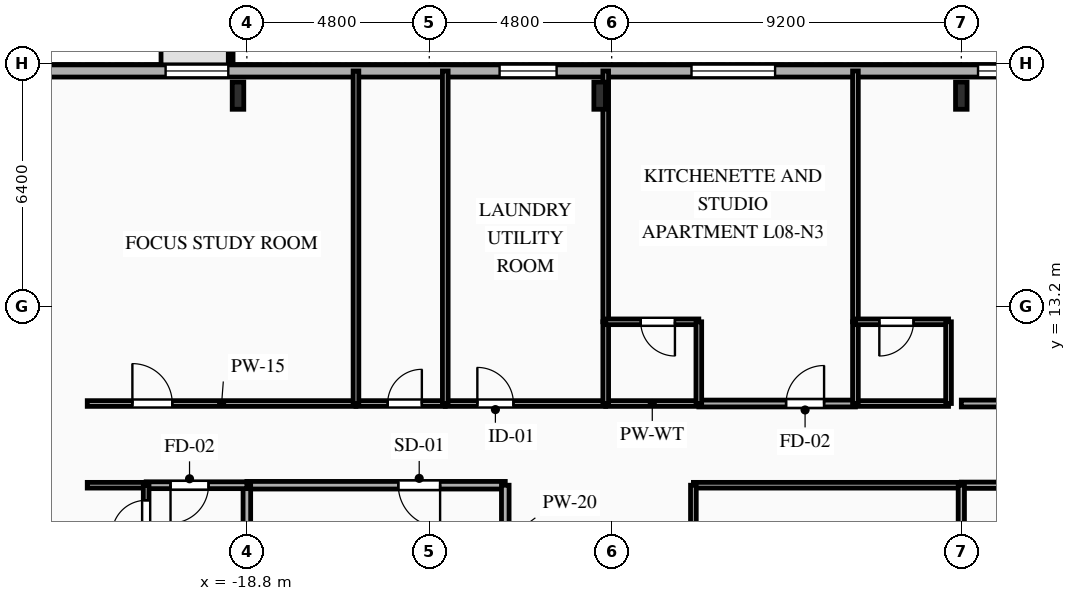
"""IFC4 building model, lengths in metres.
Left out: names, types, materials, properties, quantities, classifications, styles, units other than length and angle.
Written with IfcOpenShell. Run it as: python <this file> out.ifc"""

import sys

from ifc_helpers import new_model, si_unit, direction, frame, frame_2d, origin, origin_2d, place, context, subcontext, project, spatial, rectangle, i_section, extrude, element, fill, save


model = new_model("IFC4")
c1 = context("Model", 3, precision=1e-05, world=origin(), true_north=direction((0.0, 1.0)))
c2 = subcontext(c1, "Body", "Model", "MODEL_VIEW")
j1 = project(units=[si_unit("LENGTHUNIT", "METRE"), si_unit("PLANEANGLEUNIT", "RADIAN")], contexts=[c1])
p1 = place(None, origin())
s1 = spatial("IfcSite", under=j1, at=p1, CompositionType="ELEMENT")
p2 = place(p1, origin())
s2 = spatial("IfcBuilding", under=s1, at=p2, CompositionType="ELEMENT")
p3 = place(p2, frame((0.0, 0.0, 33.7)))
s3 = spatial("IfcBuildingStorey", under=s2, at=p3, CompositionType="ELEMENT", Elevation=33.7)
for number, where, z_axis, x_axis in (
    (1, (0.0, 18.75, 0.0), (0.0, 0.0, 1.0), (1.0, 0.0, 0.0)),
    (2, (-9.517, 18.75, 0.0), (0.0, 0.0, 1.0), (1.0, 0.0, 0.0)),
    (3, (-19.033, 18.75, 0.0), (0.0, 0.0, 1.0), (1.0, 0.0, 0.0)),
):
    element("IfcColumn", number, at=place(p3, frame(where, z_axis=z_axis, x_axis=x_axis)), inside=s3, PredefinedType="COLUMN", context=c2, shape_type="SweptSolid", body=[
        extrude(i_section(OverallWidth=0.304, OverallDepth=0.716, WebThickness=0.021, FlangeThickness=0.04, FilletRadius=0.027, at=origin_2d()), origin(), (0.0, 0.0, 1.0), 3.35),
    ])
p4 = place(p3, frame((-29.2, 19.4, 0.0), z_axis=(0.0, 0.0, 1.0), x_axis=(1.0, 0.0, 0.0)))
e4 = element("IfcWall", 4, at=p4, inside=s3, PredefinedType="SOLIDWALL", context=c2, shape_type="SweptSolid", body=[
    extrude(rectangle(XDim=58.4, YDim=0.32, at=frame_2d((29.2, 0.0))), origin(), (0.0, 0.0, 1.0), 3.035),
])
p5 = place(p4, frame((8.261, 0.0, 0.85)))
e5 = element("IfcOpeningElement", 5, at=p5, cuts=e4, PredefinedType="OPENING", context=c2, shape_type="SweptSolid", body=[
    extrude(rectangle(XDim=1.65, YDim=1.85, at=frame_2d((0.825, 0.925))), frame((0.0, 0.17, 0.0), z_axis=(0.0, -1.0, 0.0), x_axis=(1.0, 0.0, 0.0)), (0.0, 0.0, 1.0), 0.34),
])
p6 = place(p4, frame((17.05, 0.0, 0.85)))
e6 = element("IfcOpeningElement", 6, at=p6, cuts=e4, PredefinedType="OPENING", context=c2, shape_type="SweptSolid", body=[
    extrude(rectangle(XDim=1.5, YDim=1.85, at=frame_2d((0.75, 0.925))), frame((0.0, 0.17, 0.0), z_axis=(0.0, -1.0, 0.0), x_axis=(1.0, 0.0, 0.0)), (0.0, 0.0, 1.0), 0.34),
])
p7 = place(p4, frame((22.1, 0.0, 0.85)))
e7 = element("IfcOpeningElement", 7, at=p7, cuts=e4, PredefinedType="OPENING", context=c2, shape_type="SweptSolid", body=[
    extrude(rectangle(XDim=2.2, YDim=1.85, at=frame_2d((1.1, 0.925))), frame((0.0, 0.17, 0.0), z_axis=(0.0, -1.0, 0.0), x_axis=(1.0, 0.0, 0.0)), (0.0, 0.0, 1.0), 0.34),
])
p8 = place(p4, frame((29.64, 0.0, 0.85)))
e8 = element("IfcOpeningElement", 8, at=p8, cuts=e4, PredefinedType="OPENING", context=c2, shape_type="SweptSolid", body=[
    extrude(rectangle(XDim=2.2, YDim=1.85, at=frame_2d((1.1, 0.925))), frame((0.0, 0.17, 0.0), z_axis=(0.0, -1.0, 0.0), x_axis=(1.0, 0.0, 0.0)), (0.0, 0.0, 1.0), 0.34),
])
p9 = place(p4, frame((35.22, 0.0, 0.85)))
e9 = element("IfcOpeningElement", 9, at=p9, cuts=e4, PredefinedType="OPENING", context=c2, shape_type="SweptSolid", body=[
    extrude(rectangle(XDim=2.2, YDim=1.85, at=frame_2d((1.1, 0.925))), frame((0.0, 0.17, 0.0), z_axis=(0.0, -1.0, 0.0), x_axis=(1.0, 0.0, 0.0)), (0.0, 0.0, 1.0), 0.34),
])
p10 = place(p4, frame((41.78, 0.0, 0.85)))
e10 = element("IfcOpeningElement", 10, at=p10, cuts=e4, PredefinedType="OPENING", context=c2, shape_type="SweptSolid", body=[
    extrude(rectangle(XDim=2.2, YDim=1.85, at=frame_2d((1.1, 0.925))), frame((0.0, 0.17, 0.0), z_axis=(0.0, -1.0, 0.0), x_axis=(1.0, 0.0, 0.0)), (0.0, 0.0, 1.0), 0.34),
])
p11 = place(p4, frame((48.905, 0.0, 0.85)))
e11 = element("IfcOpeningElement", 11, at=p11, cuts=e4, PredefinedType="OPENING", context=c2, shape_type="SweptSolid", body=[
    extrude(rectangle(XDim=1.65, YDim=1.85, at=frame_2d((0.825, 0.925))), frame((0.0, 0.17, 0.0), z_axis=(0.0, -1.0, 0.0), x_axis=(1.0, 0.0, 0.0)), (0.0, 0.0, 1.0), 0.34),
])
p12 = place(p3, frame((-12.0, 8.5, 0.0), z_axis=(0.0, 0.0, 1.0), x_axis=(-1.0, 0.0, 0.0)))
e12 = element("IfcWall", 12, at=p12, inside=s3, PredefinedType="PARTITIONING", context=c2, shape_type="SweptSolid", body=[
    extrude(rectangle(XDim=6.8, YDim=0.2, at=frame_2d((3.4, 0.0))), origin(), (0.0, 0.0, 1.0), 3.035),
])
p13 = place(p12, frame((1.715, 0.0, 0.0)))
e13 = element("IfcOpeningElement", 13, at=p13, cuts=e12, PredefinedType="OPENING", context=c2, shape_type="SweptSolid", body=[
    extrude(rectangle(XDim=1.1, YDim=2.15, at=frame_2d((0.55, 1.075))), frame((0.0, 0.11, 0.0), z_axis=(0.0, -1.0, 0.0), x_axis=(1.0, 0.0, 0.0)), (0.0, 0.0, 1.0), 0.22),
])
p14 = place(p3, frame((-12.0, 5.6, 0.0), z_axis=(0.0, 0.0, 1.0), x_axis=(0.0, 1.0, 0.0)))
e14 = element("IfcWall", 14, at=p14, inside=s3, PredefinedType="PARTITIONING", context=c2, shape_type="SweptSolid", body=[
    extrude(rectangle(XDim=2.9, YDim=0.2, at=frame_2d((1.45, 0.0))), origin(), (0.0, 0.0, 1.0), 3.035),
])
p15 = place(p3, frame((-18.8, 8.5, 0.0), z_axis=(0.0, 0.0, 1.0), x_axis=(0.0, -1.0, 0.0)))
e15 = element("IfcWall", 15, at=p15, inside=s3, PredefinedType="PARTITIONING", context=c2, shape_type="SweptSolid", body=[
    extrude(rectangle(XDim=2.9, YDim=0.2, at=frame_2d((1.45, 0.0))), origin(), (0.0, 0.0, 1.0), 2.52),
])
p16 = place(p3, frame((-18.8, 8.5, 0.0), z_axis=(0.0, 0.0, 1.0), x_axis=(-1.0, 0.0, 0.0)))
e16 = element("IfcWall", 16, at=p16, inside=s3, PredefinedType="PARTITIONING", context=c2, shape_type="SweptSolid", body=[
    extrude(rectangle(XDim=2.65, YDim=0.18, at=frame_2d((1.325, 0.0))), origin(), (0.0, 0.0, 1.0), 3.035),
])
p17 = place(p16, frame((1.009, 0.0, 0.0)))
e17 = element("IfcOpeningElement", 17, at=p17, cuts=e16, PredefinedType="OPENING", context=c2, shape_type="SweptSolid", body=[
    extrude(rectangle(XDim=1.0, YDim=2.15, at=frame_2d((0.5, 1.075))), frame((0.0, 0.1, 0.0), z_axis=(0.0, -1.0, 0.0), x_axis=(1.0, 0.0, 0.0)), (0.0, 0.0, 1.0), 0.2),
])
p18 = place(p3, frame((-21.45, 8.5, 0.0), z_axis=(0.0, 0.0, 1.0), x_axis=(-1.0, 0.0, 0.0)))
e18 = element("IfcWall", 18, at=p18, inside=s3, PredefinedType="PARTITIONING", context=c2, shape_type="SweptSolid", body=[
    extrude(rectangle(XDim=1.55, YDim=0.15, at=frame_2d((0.775, 0.0))), origin(), (0.0, 0.0, 1.0), 3.035),
])
p19 = place(p3, frame((-23.0, 10.65, 0.0), z_axis=(0.0, 0.0, 1.0), x_axis=(1.0, 0.0, 0.0)))
e19 = element("IfcWall", 19, at=p19, inside=s3, PredefinedType="PARTITIONING", context=c2, shape_type="SweptSolid", body=[
    extrude(rectangle(XDim=7.071, YDim=0.15, at=frame_2d((3.536, 0.0))), origin(), (0.0, 0.0, 1.0), 3.035),
])
p20 = place(p19, frame((1.188, 0.0, 0.0)))
e20 = element("IfcOpeningElement", 20, at=p20, cuts=e19, PredefinedType="OPENING", context=c2, shape_type="SweptSolid", body=[
    extrude(rectangle(XDim=1.05, YDim=2.15, at=frame_2d((0.525, 1.075))), frame((0.0, 0.085, 0.0), z_axis=(0.0, -1.0, 0.0), x_axis=(1.0, 0.0, 0.0)), (0.0, 0.0, 1.0), 0.17),
])
p21 = place(p3, frame((-15.929, 10.65, 0.0), z_axis=(0.0, 0.0, 1.0), x_axis=(1.0, 0.0, 0.0)))
e21 = element("IfcWall", 21, at=p21, inside=s3, PredefinedType="PLUMBINGWALL", context=c2, shape_type="SweptSolid", body=[
    extrude(rectangle(XDim=2.35, YDim=0.15, at=frame_2d((1.175, 0.0))), origin(), (0.0, 0.0, 1.0), 3.035),
])
p22 = place(p21, frame((0.834, 0.0, 0.0)))
e22 = element("IfcOpeningElement", 22, at=p22, cuts=e21, PredefinedType="OPENING", context=c2, shape_type="SweptSolid", body=[
    extrude(rectangle(XDim=0.9, YDim=2.1, at=frame_2d((0.45, 1.05))), frame((0.0, 0.085, 0.0), z_axis=(0.0, -1.0, 0.0), x_axis=(1.0, 0.0, 0.0)), (0.0, 0.0, 1.0), 0.17),
])
p23 = place(p3, frame((-13.579, 10.65, 0.0), z_axis=(0.0, 0.0, 1.0), x_axis=(1.0, 0.0, 0.0)))
e23 = element("IfcWall", 23, at=p23, inside=s3, PredefinedType="PARTITIONING", context=c2, shape_type="SweptSolid", body=[
    extrude(rectangle(XDim=4.222, YDim=0.15, at=frame_2d((2.111, 0.0))), origin(), (0.0, 0.0, 1.0), 3.035),
])
p24 = place(p23, frame((0.844, 0.0, 0.0)))
e24 = element("IfcOpeningElement", 24, at=p24, cuts=e23, PredefinedType="OPENING", context=c2, shape_type="SweptSolid", body=[
    extrude(rectangle(XDim=0.95, YDim=2.1, at=frame_2d((0.475, 1.05))), frame((0.0, 0.085, 0.0), z_axis=(0.0, -1.0, 0.0), x_axis=(1.0, 0.0, 0.0)), (0.0, 0.0, 1.0), 0.17),
])
p25 = place(p3, frame((-6.907, 10.65, 0.0), z_axis=(0.0, 0.0, 1.0), x_axis=(1.0, 0.0, 0.0)))
e25 = element("IfcWall", 25, at=p25, inside=s3, PredefinedType="PARTITIONING", context=c2, shape_type="SweptSolid", body=[
    extrude(rectangle(XDim=4.121, YDim=0.18, at=frame_2d((2.061, 0.0))), origin(), (0.0, 0.0, 1.0), 3.035),
])
p26 = place(p25, frame((2.296, 0.0, 0.0)))
e26 = element("IfcOpeningElement", 26, at=p26, cuts=e25, PredefinedType="OPENING", context=c2, shape_type="SweptSolid", body=[
    extrude(rectangle(XDim=1.0, YDim=2.15, at=frame_2d((0.5, 1.075))), frame((0.0, 0.1, 0.0), z_axis=(0.0, -1.0, 0.0), x_axis=(1.0, 0.0, 0.0)), (0.0, 0.0, 1.0), 0.2),
])
for number, where, z_axis, x_axis in (
    (27, (-9.357, 10.65, 0.0), (0.0, 0.0, 1.0), (1.0, 0.0, 0.0)),
    (28, (-2.786, 10.65, 0.0), (0.0, 0.0, 1.0), (1.0, 0.0, 0.0)),
):
    element("IfcWall", number, at=place(p3, frame(where, z_axis=z_axis, x_axis=x_axis)), inside=s3, PredefinedType="PLUMBINGWALL", context=c2, shape_type="SweptSolid", body=[
        extrude(rectangle(XDim=2.45, YDim=0.15, at=frame_2d((1.225, 0.0))), origin(), (0.0, 0.0, 1.0), 3.035),
    ])
p27 = place(p3, frame((0.0, 8.5, 0.0), z_axis=(0.0, 0.0, 1.0), x_axis=(-1.0, 0.0, 0.0)))
e29 = element("IfcWall", 29, at=p27, inside=s3, PredefinedType="PARTITIONING", context=c2, shape_type="SweptSolid", body=[
    extrude(rectangle(XDim=7.05, YDim=0.15, at=frame_2d((3.525, 0.0))), origin(), (0.0, 0.0, 1.0), 3.035),
])
p28 = place(p3, frame((0.0, 10.65, 0.0), z_axis=(0.0, 0.0, 1.0), x_axis=(1.0, 0.0, 0.0)))
e30 = element("IfcWall", 30, at=p28, inside=s3, PredefinedType="PARTITIONING", context=c2, shape_type="SweptSolid", body=[
    extrude(rectangle(XDim=3.786, YDim=0.18, at=frame_2d((1.893, 0.0))), origin(), (0.0, 0.0, 1.0), 3.035),
])
p29 = place(p28, frame((1.393, 0.0, 0.0)))
e31 = element("IfcOpeningElement", 31, at=p29, cuts=e30, PredefinedType="OPENING", context=c2, shape_type="SweptSolid", body=[
    extrude(rectangle(XDim=1.0, YDim=2.15, at=frame_2d((0.5, 1.075))), frame((0.0, 0.1, 0.0), z_axis=(0.0, -1.0, 0.0), x_axis=(1.0, 0.0, 0.0)), (0.0, 0.0, 1.0), 0.2),
])
p30 = place(p3, frame((7.05, 8.5, 0.0), z_axis=(0.0, 0.0, 1.0), x_axis=(-1.0, 0.0, 0.0)))
e32 = element("IfcWall", 32, at=p30, inside=s3, PredefinedType="PARTITIONING", context=c2, shape_type="SweptSolid", body=[
    extrude(rectangle(XDim=7.05, YDim=0.165, at=frame_2d((3.525, 0.0))), origin(), (0.0, 0.0, 1.0), 3.035),
])
p31 = place(p30, frame((4.728, 0.0, 0.0)))
e33 = element("IfcOpeningElement", 33, at=p31, cuts=e32, PredefinedType="OPENING", context=c2, shape_type="SweptSolid", body=[
    extrude(rectangle(XDim=1.15, YDim=2.15, at=frame_2d((0.575, 1.075))), frame((0.0, 0.093, 0.0), z_axis=(0.0, -1.0, 0.0), x_axis=(1.0, 0.0, 0.0)), (0.0, 0.0, 1.0), 0.185),
])
p32 = place(p3, frame((-7.05, 8.5, 0.0), z_axis=(0.0, 0.0, 1.0), x_axis=(0.0, -1.0, 0.0)))
e34 = element("IfcWall", 34, at=p32, inside=s3, PredefinedType="PARTITIONING", context=c2, shape_type="SweptSolid", body=[
    extrude(rectangle(XDim=14.1, YDim=0.15, at=frame_2d((7.05, 0.0))), origin(), (0.0, 0.0, 1.0), 3.035),
])
p33 = place(p32, frame((8.011, 0.0, 0.0)))
e35 = element("IfcOpeningElement", 35, at=p33, cuts=e34, PredefinedType="OPENING", context=c2, shape_type="SweptSolid", body=[
    extrude(rectangle(XDim=1.05, YDim=2.15, at=frame_2d((0.525, 1.075))), frame((0.0, 0.085, 0.0), z_axis=(0.0, -1.0, 0.0), x_axis=(1.0, 0.0, 0.0)), (0.0, 0.0, 1.0), 0.17),
])
p34 = place(p3, frame((-21.45, 6.808, 0.0), z_axis=(0.0, 0.0, 1.0), x_axis=(0.0, 1.0, 0.0)))
e36 = element("IfcWall", 36, at=p34, inside=s3, PredefinedType="PARTITIONING", context=c2, shape_type="SweptSolid", body=[
    extrude(rectangle(XDim=1.692, YDim=0.15, at=frame_2d((0.846, 0.0))), origin(), (0.0, 0.0, 1.0), 3.035),
])
p35 = place(p34, frame((0.396, 0.0, 0.0)))
e37 = element("IfcOpeningElement", 37, at=p35, cuts=e36, PredefinedType="OPENING", context=c2, shape_type="SweptSolid", body=[
    extrude(rectangle(XDim=0.9, YDim=2.1, at=frame_2d((0.45, 1.05))), frame((0.0, 0.085, 0.0), z_axis=(0.0, -1.0, 0.0), x_axis=(1.0, 0.0, 0.0)), (0.0, 0.0, 1.0), 0.17),
])
for number, where, z_axis, x_axis in (
    (38, (-15.929, 19.4, 0.0), (0.0, 0.0, 1.0), (0.0, -1.0, 0.0)),
    (39, (-13.579, 19.4, 0.0), (0.0, 0.0, 1.0), (0.0, -1.0, 0.0)),
):
    element("IfcWall", number, at=place(p3, frame(where, z_axis=z_axis, x_axis=x_axis)), inside=s3, PredefinedType="PLUMBINGWALL", context=c2, shape_type="SweptSolid", body=[
        extrude(rectangle(XDim=8.75, YDim=0.15, at=frame_2d((4.375, 0.0))), origin(), (0.0, 0.0, 1.0), 3.035),
    ])
p36 = place(p3, frame((-9.357, 19.4, 0.0), z_axis=(0.0, 0.0, 1.0), x_axis=(0.0, -1.0, 0.0)))
e40 = element("IfcWall", 40, at=p36, inside=s3, PredefinedType="PARTITIONING", context=c2, shape_type="SweptSolid", body=[
    extrude(rectangle(XDim=6.6, YDim=0.15, at=frame_2d((3.3, 0.0))), origin(), (0.0, 0.0, 1.0), 2.52),
])
p37 = place(p3, frame((-9.357, 12.8, 0.0), z_axis=(0.0, 0.0, 1.0), x_axis=(0.0, -1.0, 0.0)))
e41 = element("IfcWall", 41, at=p37, inside=s3, PredefinedType="PLUMBINGWALL", context=c2, shape_type="SweptSolid", body=[
    extrude(rectangle(XDim=2.15, YDim=0.15, at=frame_2d((1.075, 0.0))), origin(), (0.0, 0.0, 1.0), 2.52),
])
p38 = place(p3, frame((-6.907, 12.8, 0.0), z_axis=(0.0, 0.0, 1.0), x_axis=(-1.0, 0.0, 0.0)))
e42 = element("IfcWall", 42, at=p38, inside=s3, PredefinedType="PLUMBINGWALL", context=c2, shape_type="SweptSolid", body=[
    extrude(rectangle(XDim=2.45, YDim=0.15, at=frame_2d((1.225, 0.0))), origin(), (0.0, 0.0, 1.0), 3.035),
])
p39 = place(p38, frame((0.629, 0.0, 0.0)))
e43 = element("IfcOpeningElement", 43, at=p39, cuts=e42, PredefinedType="OPENING", context=c2, shape_type="SweptSolid", body=[
    extrude(rectangle(XDim=0.9, YDim=2.1, at=frame_2d((0.45, 1.05))), frame((0.0, 0.085, 0.0), z_axis=(0.0, -1.0, 0.0), x_axis=(1.0, 0.0, 0.0)), (0.0, 0.0, 1.0), 0.17),
])
p40 = place(p3, frame((-6.907, 10.65, 0.0), z_axis=(0.0, 0.0, 1.0), x_axis=(0.0, 1.0, 0.0)))
e44 = element("IfcWall", 44, at=p40, inside=s3, PredefinedType="PLUMBINGWALL", context=c2, shape_type="SweptSolid", body=[
    extrude(rectangle(XDim=2.15, YDim=0.15, at=frame_2d((1.075, 0.0))), origin(), (0.0, 0.0, 1.0), 3.035),
])
p41 = place(p3, frame((-2.786, 19.4, 0.0), z_axis=(0.0, 0.0, 1.0), x_axis=(0.0, -1.0, 0.0)))
e45 = element("IfcWall", 45, at=p41, inside=s3, PredefinedType="PARTITIONING", context=c2, shape_type="SweptSolid", body=[
    extrude(rectangle(XDim=6.6, YDim=0.15, at=frame_2d((3.3, 0.0))), origin(), (0.0, 0.0, 1.0), 3.035),
])
p42 = place(p3, frame((-2.786, 12.8, 0.0), z_axis=(0.0, 0.0, 1.0), x_axis=(0.0, -1.0, 0.0)))
e46 = element("IfcWall", 46, at=p42, inside=s3, PredefinedType="PLUMBINGWALL", context=c2, shape_type="SweptSolid", body=[
    extrude(rectangle(XDim=2.15, YDim=0.15, at=frame_2d((1.075, 0.0))), origin(), (0.0, 0.0, 1.0), 3.035),
])
p43 = place(p3, frame((-0.336, 12.8, 0.0), z_axis=(0.0, 0.0, 1.0), x_axis=(-1.0, 0.0, 0.0)))
e47 = element("IfcWall", 47, at=p43, inside=s3, PredefinedType="PLUMBINGWALL", context=c2, shape_type="SweptSolid", body=[
    extrude(rectangle(XDim=2.45, YDim=0.15, at=frame_2d((1.225, 0.0))), origin(), (0.0, 0.0, 1.0), 3.035),
])
p44 = place(p43, frame((0.921, 0.0, 0.0)))
e48 = element("IfcOpeningElement", 48, at=p44, cuts=e47, PredefinedType="OPENING", context=c2, shape_type="SweptSolid", body=[
    extrude(rectangle(XDim=0.9, YDim=2.1, at=frame_2d((0.45, 1.05))), frame((0.0, 0.085, 0.0), z_axis=(0.0, -1.0, 0.0), x_axis=(1.0, 0.0, 0.0)), (0.0, 0.0, 1.0), 0.17),
])
p45 = place(p3, frame((-0.336, 10.65, 0.0), z_axis=(0.0, 0.0, 1.0), x_axis=(0.0, 1.0, 0.0)))
e49 = element("IfcWall", 49, at=p45, inside=s3, PredefinedType="PLUMBINGWALL", context=c2, shape_type="SweptSolid", body=[
    extrude(rectangle(XDim=2.15, YDim=0.15, at=frame_2d((1.075, 0.0))), origin(), (0.0, 0.0, 1.0), 3.035),
])
p46 = place(p3, frame((0.0, 8.5, 0.0), z_axis=(0.0, 0.0, 1.0), x_axis=(0.0, -1.0, 0.0)))
e50 = element("IfcWall", 50, at=p46, inside=s3, PredefinedType="PARTITIONING", context=c2, shape_type="SweptSolid", body=[
    extrude(rectangle(XDim=7.05, YDim=0.165, at=frame_2d((3.525, 0.0))), origin(), (0.0, 0.0, 1.0), 3.035),
])
p47 = place(p5, origin())
e51 = element("IfcWindow", 51, at=p47, inside=s3, PartitioningType="SINGLE_PANEL", PredefinedType="WINDOW", context=c2, shape_type="SweptSolid", body=[
    extrude(rectangle(XDim=1.65, YDim=1.85, at=frame_2d((0.825, 0.925))), frame((0.0, 0.03, 0.0), z_axis=(0.0, -1.0, 0.0), x_axis=(1.0, 0.0, 0.0)), (0.0, 0.0, 1.0), 0.06),
])
fill(e5, e51)
p48 = place(p6, origin())
e52 = element("IfcWindow", 52, at=p48, inside=s3, PartitioningType="SINGLE_PANEL", PredefinedType="WINDOW", context=c2, shape_type="SweptSolid", body=[
    extrude(rectangle(XDim=1.5, YDim=1.85, at=frame_2d((0.75, 0.925))), frame((0.0, 0.03, 0.0), z_axis=(0.0, -1.0, 0.0), x_axis=(1.0, 0.0, 0.0)), (0.0, 0.0, 1.0), 0.06),
])
fill(e6, e52)
p49 = place(p7, origin())
e53 = element("IfcWindow", 53, at=p49, inside=s3, PartitioningType="SINGLE_PANEL", PredefinedType="WINDOW", context=c2, shape_type="SweptSolid", body=[
    extrude(rectangle(XDim=2.2, YDim=1.85, at=frame_2d((1.1, 0.925))), frame((0.0, 0.03, 0.0), z_axis=(0.0, -1.0, 0.0), x_axis=(1.0, 0.0, 0.0)), (0.0, 0.0, 1.0), 0.06),
])
fill(e7, e53)
p50 = place(p8, origin())
e54 = element("IfcWindow", 54, at=p50, inside=s3, PartitioningType="SINGLE_PANEL", PredefinedType="WINDOW", context=c2, shape_type="SweptSolid", body=[
    extrude(rectangle(XDim=2.2, YDim=1.85, at=frame_2d((1.1, 0.925))), frame((0.0, 0.03, 0.0), z_axis=(0.0, -1.0, 0.0), x_axis=(1.0, 0.0, 0.0)), (0.0, 0.0, 1.0), 0.06),
])
fill(e8, e54)
p51 = place(p13, origin())
e55 = element("IfcDoor", 55, at=p51, inside=s3, OperationType="SINGLE_SWING_LEFT", PredefinedType="DOOR", context=c2, shape_type="SweptSolid", body=[
    extrude(rectangle(XDim=1.1, YDim=2.15, at=frame_2d((0.55, 1.075))), frame((0.0, 0.025, 0.0), z_axis=(0.0, -1.0, 0.0), x_axis=(1.0, 0.0, 0.0)), (0.0, 0.0, 1.0), 0.05),
])
fill(e13, e55)
p52 = place(p17, origin())
e56 = element("IfcDoor", 56, at=p52, inside=s3, OperationType="SINGLE_SWING_RIGHT", PredefinedType="DOOR", context=c2, shape_type="SweptSolid", body=[
    extrude(rectangle(XDim=1.0, YDim=2.15, at=frame_2d((0.5, 1.075))), frame((0.0, 0.025, 0.0), z_axis=(0.0, -1.0, 0.0), x_axis=(1.0, 0.0, 0.0)), (0.0, 0.0, 1.0), 0.05),
])
fill(e17, e56)
p53 = place(p20, origin())
e57 = element("IfcDoor", 57, at=p53, inside=s3, OperationType="SINGLE_SWING_LEFT", PredefinedType="DOOR", context=c2, shape_type="SweptSolid", body=[
    extrude(rectangle(XDim=1.05, YDim=2.15, at=frame_2d((0.525, 1.075))), frame((0.0, 0.025, 0.0), z_axis=(0.0, -1.0, 0.0), x_axis=(1.0, 0.0, 0.0)), (0.0, 0.0, 1.0), 0.05),
])
fill(e20, e57)
p54 = place(p22, origin())
e58 = element("IfcDoor", 58, at=p54, inside=s3, OperationType="SINGLE_SWING_RIGHT", PredefinedType="DOOR", context=c2, shape_type="SweptSolid", body=[
    extrude(rectangle(XDim=0.9, YDim=2.1, at=frame_2d((0.45, 1.05))), frame((0.0, 0.025, 0.0), z_axis=(0.0, -1.0, 0.0), x_axis=(1.0, 0.0, 0.0)), (0.0, 0.0, 1.0), 0.05),
])
fill(e22, e58)
p55 = place(p24, origin())
e59 = element("IfcDoor", 59, at=p55, inside=s3, OperationType="SINGLE_SWING_LEFT", PredefinedType="DOOR", context=c2, shape_type="SweptSolid", body=[
    extrude(rectangle(XDim=0.95, YDim=2.1, at=frame_2d((0.475, 1.05))), frame((0.0, 0.025, 0.0), z_axis=(0.0, -1.0, 0.0), x_axis=(1.0, 0.0, 0.0)), (0.0, 0.0, 1.0), 0.05),
])
fill(e24, e59)
p56 = place(p26, origin())
e60 = element("IfcDoor", 60, at=p56, inside=s3, OperationType="SINGLE_SWING_RIGHT", PredefinedType="DOOR", context=c2, shape_type="SweptSolid", body=[
    extrude(rectangle(XDim=1.0, YDim=2.15, at=frame_2d((0.5, 1.075))), frame((0.0, 0.025, 0.0), z_axis=(0.0, -1.0, 0.0), x_axis=(1.0, 0.0, 0.0)), (0.0, 0.0, 1.0), 0.05),
])
fill(e26, e60)
p57 = place(p35, origin())
e61 = element("IfcDoor", 61, at=p57, inside=s3, OperationType="SINGLE_SWING_LEFT", PredefinedType="DOOR", context=c2, shape_type="SweptSolid", body=[
    extrude(rectangle(XDim=0.9, YDim=2.1, at=frame_2d((0.45, 1.05))), frame((0.0, 0.025, 0.0), z_axis=(0.0, -1.0, 0.0), x_axis=(1.0, 0.0, 0.0)), (0.0, 0.0, 1.0), 0.05),
])
fill(e37, e61)
p58 = place(p39, origin())
e62 = element("IfcDoor", 62, at=p58, inside=s3, OperationType="SINGLE_SWING_LEFT", PredefinedType="DOOR", context=c2, shape_type="SweptSolid", body=[
    extrude(rectangle(XDim=0.9, YDim=2.1, at=frame_2d((0.45, 1.05))), frame((0.0, 0.025, 0.0), z_axis=(0.0, -1.0, 0.0), x_axis=(1.0, 0.0, 0.0)), (0.0, 0.0, 1.0), 0.05),
])
fill(e43, e62)
p59 = place(p44, origin())
e63 = element("IfcDoor", 63, at=p59, inside=s3, OperationType="SINGLE_SWING_RIGHT", PredefinedType="DOOR", context=c2, shape_type="SweptSolid", body=[
    extrude(rectangle(XDim=0.9, YDim=2.1, at=frame_2d((0.45, 1.05))), frame((0.0, 0.025, 0.0), z_axis=(0.0, -1.0, 0.0), x_axis=(1.0, 0.0, 0.0)), (0.0, 0.0, 1.0), 0.05),
])
fill(e48, e63)
save(model, sys.argv[1])
